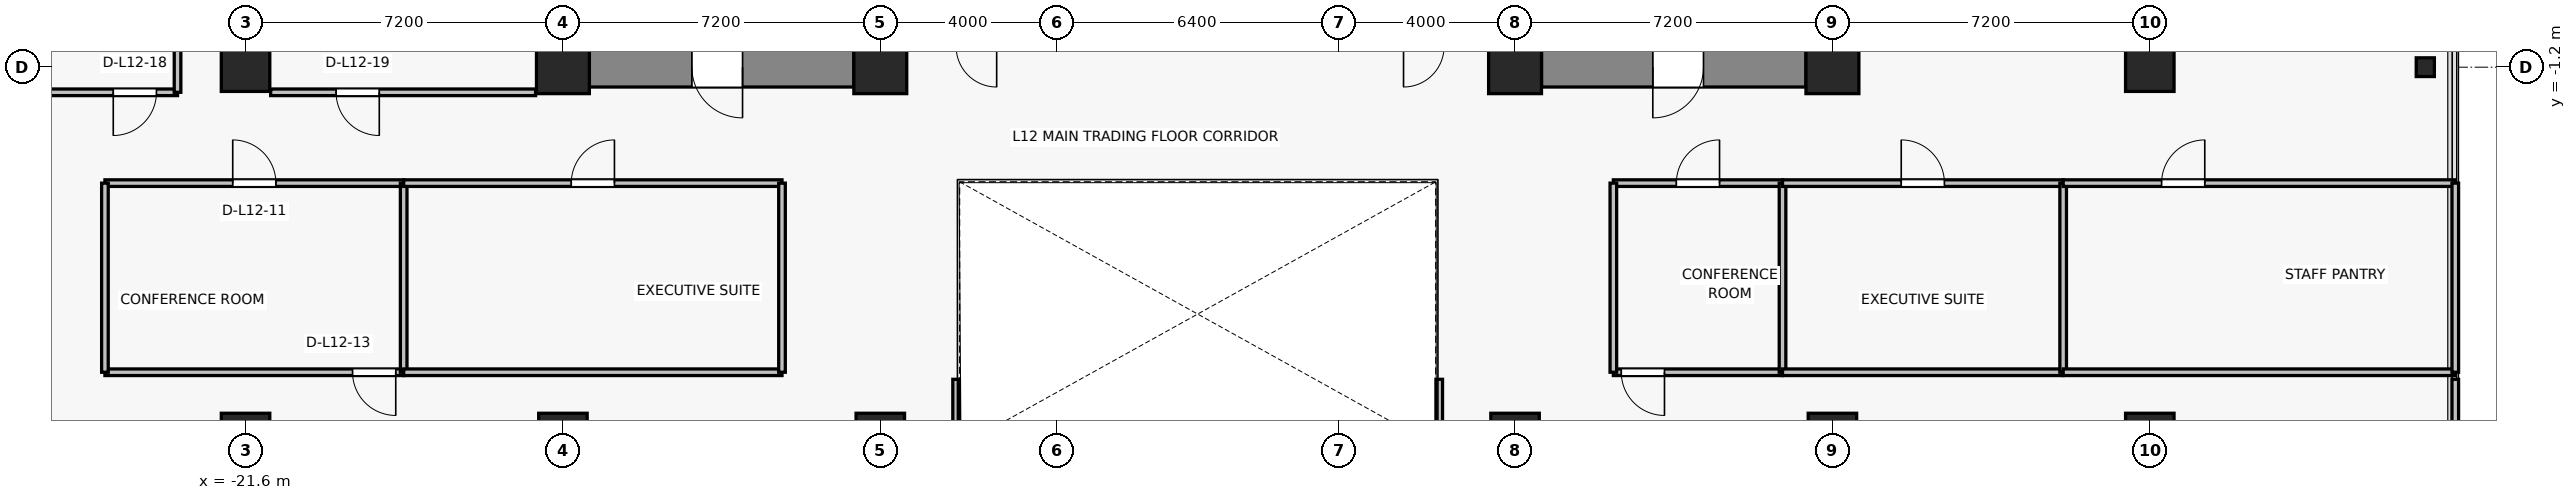
"""IFC4 building model, lengths in metres.
Left out: names, types, materials, properties, quantities, classifications, styles, units other than length and angle.
Written with IfcOpenShell. Run it as: python <this file> out.ifc"""

import sys

from ifc_helpers import new_model, si_unit, direction, frame, frame_2d, origin, origin_2d, place, context, subcontext, project, spatial, rectangle, i_section, extrude, source, transform, mapped, element, fill, save


model = new_model("IFC4")
c1 = context("Model", 3, precision=1e-05, world=origin(), true_north=direction((0.0, 1.0)))
c2 = subcontext(c1, "Body", "Model", "MODEL_VIEW")
j1 = project(units=[si_unit("LENGTHUNIT", "METRE"), si_unit("PLANEANGLEUNIT", "RADIAN")], contexts=[c1])
p1 = place(None, origin())
s1 = spatial("IfcSite", under=j1, at=p1, CompositionType="ELEMENT")
p2 = place(p1, origin())
s2 = spatial("IfcBuilding", under=s1, at=p2, CompositionType="ELEMENT")
p3 = place(p2, frame((0.0, 0.0, 47.2)))
s3 = spatial("IfcBuildingStorey", under=s2, at=p3, CompositionType="ELEMENT", Elevation=47.2)
for number, where, z_axis, x_axis in (
    (1, (-14.4, -1.2, 0.0), (0.0, 0.0, 1.0), (1.0, 0.0, 0.0)),
    (2, (-7.2, -1.2, 0.0), (0.0, 0.0, 1.0), (1.0, 0.0, 0.0)),
    (3, (7.2, -1.2, 0.0), (0.0, 0.0, 1.0), (1.0, 0.0, 0.0)),
    (4, (14.4, -1.2, 0.0), (0.0, 0.0, 1.0), (1.0, 0.0, 0.0)),
):
    element("IfcColumn", number, at=place(p3, frame(where, z_axis=z_axis, x_axis=x_axis)), inside=s3, PredefinedType="COLUMN", context=c2, shape_type="SweptSolid", body=[
        extrude(rectangle(XDim=1.2, YDim=1.2, at=origin_2d()), origin(), (0.0, 0.0, 1.0), 3.3),
    ])
for number, where, z_axis, x_axis in (
    (5, (-14.4, -9.6, 0.0), (0.0, 0.0, 1.0), (1.0, 0.0, 0.0)),
    (6, (-7.2, -9.6, 0.0), (0.0, 0.0, 1.0), (1.0, 0.0, 0.0)),
    (7, (7.2, -9.6, 0.0), (0.0, 0.0, 1.0), (1.0, 0.0, 0.0)),
    (8, (14.4, -9.6, 0.0), (0.0, 0.0, 1.0), (1.0, 0.0, 0.0)),
    (9, (-21.6, -9.6, 0.0), (0.0, 0.0, 1.0), (1.0, 0.0, 0.0)),
    (10, (-21.6, -1.2, 0.0), (0.0, 0.0, 1.0), (1.0, 0.0, 0.0)),
    (11, (21.6, -9.6, 0.0), (0.0, 0.0, 1.0), (1.0, 0.0, 0.0)),
    (12, (21.6, -1.2, 0.0), (0.0, 0.0, 1.0), (1.0, 0.0, 0.0)),
):
    element("IfcColumn", number, at=place(p3, frame(where, z_axis=z_axis, x_axis=x_axis)), inside=s3, PredefinedType="COLUMN", context=c2, shape_type="SweptSolid", body=[
        extrude(rectangle(XDim=1.1, YDim=1.1, at=origin_2d()), origin(), (0.0, 0.0, 1.0), 3.3),
    ])
p4 = place(p3, frame((27.85, -1.2, 0.0), z_axis=(0.0, 0.0, 1.0), x_axis=(1.0, 0.0, 0.0)))
e13 = element("IfcColumn", 13, at=p4, inside=s3, PredefinedType="COLUMN", context=c2, shape_type="SweptSolid", body=[
    extrude(i_section(OverallWidth=0.412, OverallDepth=0.425, WebThickness=0.026, FlangeThickness=0.039, FilletRadius=0.015, at=origin_2d()), origin(), (0.0, 0.0, 1.0), 3.3),
])
p5 = place(p3, frame((-7.8, -1.2, 0.0), z_axis=(0.0, 0.0, 1.0), x_axis=(-1.0, 0.0, 0.0)))
e14 = element("IfcWall", 14, at=p5, inside=s3, PredefinedType="SHEAR", context=c2, shape_type="SweptSolid", body=[
    extrude(rectangle(XDim=6.0, YDim=0.9, at=frame_2d((3.0, 0.0))), origin(), (0.0, 0.0, 1.0), 3.075),
])
p6 = place(p5, frame((2.525, 0.0, 0.0)))
e15 = element("IfcOpeningElement", 15, at=p6, cuts=e14, PredefinedType="OPENING", context=c2, shape_type="SweptSolid", body=[
    extrude(rectangle(XDim=1.15, YDim=2.15, at=frame_2d((0.575, 1.075))), frame((0.0, 0.46, 0.0), z_axis=(0.0, -1.0, 0.0), x_axis=(1.0, 0.0, 0.0)), (0.0, 0.0, 1.0), 0.92),
])
p7 = place(p3, frame((13.8, -1.2, 0.0), z_axis=(0.0, 0.0, 1.0), x_axis=(-1.0, 0.0, 0.0)))
e16 = element("IfcWall", 16, at=p7, inside=s3, PredefinedType="SHEAR", context=c2, shape_type="SweptSolid", body=[
    extrude(rectangle(XDim=6.0, YDim=0.9, at=frame_2d((3.0, 0.0))), origin(), (0.0, 0.0, 1.0), 3.075),
])
p8 = place(p7, frame((2.325, 0.0, 0.0)))
e17 = element("IfcOpeningElement", 17, at=p8, cuts=e16, PredefinedType="OPENING", context=c2, shape_type="SweptSolid", body=[
    extrude(rectangle(XDim=1.15, YDim=2.15, at=frame_2d((0.575, 1.075))), frame((0.0, 0.46, 0.0), z_axis=(0.0, -1.0, 0.0), x_axis=(1.0, 0.0, 0.0)), (0.0, 0.0, 1.0), 0.92),
])
p9 = place(p3, frame((-18.012, -8.12, 0.0), z_axis=(0.0, 0.0, 1.0), x_axis=(-1.0, 0.0, 0.0)))
e18 = element("IfcWall", 18, at=p9, inside=s3, PredefinedType="PARTITIONING", context=c2, shape_type="SweptSolid", body=[
    extrude(rectangle(XDim=6.778, YDim=0.15, at=frame_2d((3.389, 0.0))), origin(), (0.0, 0.0, 1.0), 2.465),
])
p10 = place(p9, frame((0.18, 0.0, 0.0)))
e19 = element("IfcOpeningElement", 19, at=p10, cuts=e18, PredefinedType="OPENING", context=c2, shape_type="SweptSolid", body=[
    extrude(rectangle(XDim=0.98, YDim=2.15, at=frame_2d((0.49, 1.075))), frame((0.0, 0.085, 0.0), z_axis=(0.0, -1.0, 0.0), x_axis=(1.0, 0.0, 0.0)), (0.0, 0.0, 1.0), 0.17),
])
p11 = place(p3, frame((-24.79, -3.83, 0.0), z_axis=(0.0, 0.0, 1.0), x_axis=(1.0, 0.0, 0.0)))
e20 = element("IfcWall", 20, at=p11, inside=s3, PredefinedType="PARTITIONING", context=c2, shape_type="SweptSolid", body=[
    extrude(rectangle(XDim=6.778, YDim=0.15, at=frame_2d((3.389, 0.0))), origin(), (0.0, 0.0, 1.0), 2.465),
])
p12 = place(p11, frame((2.899, 0.0, 0.0)))
e21 = element("IfcOpeningElement", 21, at=p12, cuts=e20, PredefinedType="OPENING", context=c2, shape_type="SweptSolid", body=[
    extrude(rectangle(XDim=0.98, YDim=2.15, at=frame_2d((0.49, 1.075))), frame((0.0, 0.085, 0.0), z_axis=(0.0, -1.0, 0.0), x_axis=(1.0, 0.0, 0.0)), (0.0, 0.0, 1.0), 0.17),
])
for number, where, z_axis, x_axis in (
    (22, (-24.79, -8.12, 0.0), (0.0, 0.0, 1.0), (0.0, 1.0, 0.0)),
    (23, (-18.012, -3.83, 0.0), (0.0, 0.0, 1.0), (0.0, -1.0, 0.0)),
):
    element("IfcWall", number, at=place(p3, frame(where, z_axis=z_axis, x_axis=x_axis)), inside=s3, PredefinedType="PARTITIONING", context=c2, shape_type="SweptSolid", body=[
        extrude(rectangle(XDim=4.29, YDim=0.15, at=frame_2d((2.145, 0.0))), origin(), (0.0, 0.0, 1.0), 2.565),
    ])
p13 = place(p3, frame((-9.43, -8.12, 0.0), z_axis=(0.0, 0.0, 1.0), x_axis=(-1.0, 0.0, 0.0)))
e24 = element("IfcWall", 24, at=p13, inside=s3, PredefinedType="PARTITIONING", context=c2, shape_type="SweptSolid", body=[
    extrude(rectangle(XDim=8.583, YDim=0.15, at=frame_2d((4.291, 0.0))), origin(), (0.0, 0.0, 1.0), 2.465),
])
p14 = place(p3, frame((-18.012, -3.83, 0.0), z_axis=(0.0, 0.0, 1.0), x_axis=(1.0, 0.0, 0.0)))
e25 = element("IfcWall", 25, at=p14, inside=s3, PredefinedType="PARTITIONING", context=c2, shape_type="SweptSolid", body=[
    extrude(rectangle(XDim=8.583, YDim=0.15, at=frame_2d((4.291, 0.0))), origin(), (0.0, 0.0, 1.0), 2.465),
])
p15 = place(p14, frame((3.802, 0.0, 0.0)))
e26 = element("IfcOpeningElement", 26, at=p15, cuts=e25, PredefinedType="OPENING", context=c2, shape_type="SweptSolid", body=[
    extrude(rectangle(XDim=0.98, YDim=2.15, at=frame_2d((0.49, 1.075))), frame((0.0, 0.085, 0.0), z_axis=(0.0, -1.0, 0.0), x_axis=(1.0, 0.0, 0.0)), (0.0, 0.0, 1.0), 0.17),
])
p16 = place(p3, frame((-9.43, -3.83, 0.0), z_axis=(0.0, 0.0, 1.0), x_axis=(0.0, -1.0, 0.0)))
e27 = element("IfcWall", 27, at=p16, inside=s3, PredefinedType="PARTITIONING", context=c2, shape_type="SweptSolid", body=[
    extrude(rectangle(XDim=4.29, YDim=0.15, at=frame_2d((2.145, 0.0))), origin(), (0.0, 0.0, 1.0), 2.565),
])
p17 = place(p3, frame((-5.48, -8.28, 0.0), z_axis=(0.0, 0.0, 1.0), x_axis=(0.0, -1.0, 0.0)))
e28 = element("IfcWall", 28, at=p17, inside=s3, PredefinedType="PARTITIONING", context=c2, shape_type="SweptSolid", body=[
    extrude(rectangle(XDim=9.85, YDim=0.15, at=frame_2d((4.925, 0.0))), origin(), (0.0, 0.0, 1.0), 2.465),
])
p18 = place(p3, frame((13.268, -8.12, 0.0), z_axis=(0.0, 0.0, 1.0), x_axis=(-1.0, 0.0, 0.0)))
e29 = element("IfcWall", 29, at=p18, inside=s3, PredefinedType="PARTITIONING", context=c2, shape_type="SweptSolid", body=[
    extrude(rectangle(XDim=3.838, YDim=0.15, at=frame_2d((1.919, 0.0))), origin(), (0.0, 0.0, 1.0), 3.075),
])
p19 = place(p18, frame((2.678, 0.0, 0.0)))
e30 = element("IfcOpeningElement", 30, at=p19, cuts=e29, PredefinedType="OPENING", context=c2, shape_type="SweptSolid", body=[
    extrude(rectangle(XDim=0.98, YDim=2.15, at=frame_2d((0.49, 1.075))), frame((0.0, 0.085, 0.0), z_axis=(0.0, -1.0, 0.0), x_axis=(1.0, 0.0, 0.0)), (0.0, 0.0, 1.0), 0.17),
])
p20 = place(p3, frame((9.43, -3.83, 0.0), z_axis=(0.0, 0.0, 1.0), x_axis=(1.0, 0.0, 0.0)))
e31 = element("IfcWall", 31, at=p20, inside=s3, PredefinedType="PARTITIONING", context=c2, shape_type="SweptSolid", body=[
    extrude(rectangle(XDim=3.838, YDim=0.15, at=frame_2d((1.919, 0.0))), origin(), (0.0, 0.0, 1.0), 3.075),
])
p21 = place(p20, frame((1.429, 0.0, 0.0)))
e32 = element("IfcOpeningElement", 32, at=p21, cuts=e31, PredefinedType="OPENING", context=c2, shape_type="SweptSolid", body=[
    extrude(rectangle(XDim=0.98, YDim=2.15, at=frame_2d((0.49, 1.075))), frame((0.0, 0.085, 0.0), z_axis=(0.0, -1.0, 0.0), x_axis=(1.0, 0.0, 0.0)), (0.0, 0.0, 1.0), 0.17),
])
for number, where, z_axis, x_axis in (
    (33, (9.43, -8.12, 0.0), (0.0, 0.0, 1.0), (0.0, 1.0, 0.0)),
    (34, (13.268, -3.83, 0.0), (0.0, 0.0, 1.0), (0.0, -1.0, 0.0)),
):
    element("IfcWall", number, at=place(p3, frame(where, z_axis=z_axis, x_axis=x_axis)), inside=s3, PredefinedType="PARTITIONING", context=c2, shape_type="SweptSolid", body=[
        extrude(rectangle(XDim=4.29, YDim=0.15, at=frame_2d((2.145, 0.0))), origin(), (0.0, 0.0, 1.0), 2.565),
    ])
p22 = place(p3, frame((19.635, -8.12, 0.0), z_axis=(0.0, 0.0, 1.0), x_axis=(-1.0, 0.0, 0.0)))
e35 = element("IfcWall", 35, at=p22, inside=s3, PredefinedType="PARTITIONING", context=c2, shape_type="SweptSolid", body=[
    extrude(rectangle(XDim=6.367, YDim=0.15, at=frame_2d((3.183, 0.0))), origin(), (0.0, 0.0, 1.0), 2.465),
])
p23 = place(p3, frame((13.268, -3.83, 0.0), z_axis=(0.0, 0.0, 1.0), x_axis=(1.0, 0.0, 0.0)))
e36 = element("IfcWall", 36, at=p23, inside=s3, PredefinedType="PARTITIONING", context=c2, shape_type="SweptSolid", body=[
    extrude(rectangle(XDim=6.367, YDim=0.15, at=frame_2d((3.183, 0.0))), origin(), (0.0, 0.0, 1.0), 2.465),
])
p24 = place(p23, frame((2.693, 0.0, 0.0)))
e37 = element("IfcOpeningElement", 37, at=p24, cuts=e36, PredefinedType="OPENING", context=c2, shape_type="SweptSolid", body=[
    extrude(rectangle(XDim=0.98, YDim=2.15, at=frame_2d((0.49, 1.075))), frame((0.0, 0.085, 0.0), z_axis=(0.0, -1.0, 0.0), x_axis=(1.0, 0.0, 0.0)), (0.0, 0.0, 1.0), 0.17),
])
p25 = place(p3, frame((19.635, -3.83, 0.0), z_axis=(0.0, 0.0, 1.0), x_axis=(0.0, -1.0, 0.0)))
e38 = element("IfcWall", 38, at=p25, inside=s3, PredefinedType="PARTITIONING", context=c2, shape_type="SweptSolid", body=[
    extrude(rectangle(XDim=4.29, YDim=0.15, at=frame_2d((2.145, 0.0))), origin(), (0.0, 0.0, 1.0), 2.565),
])
p26 = place(p3, frame((28.53, -8.12, 0.0), z_axis=(0.0, 0.0, 1.0), x_axis=(-1.0, 0.0, 0.0)))
e39 = element("IfcWall", 39, at=p26, inside=s3, PredefinedType="PARTITIONING", context=c2, shape_type="SweptSolid", body=[
    extrude(rectangle(XDim=8.895, YDim=0.15, at=frame_2d((4.448, 0.0))), origin(), (0.0, 0.0, 1.0), 2.465),
])
p27 = place(p3, frame((19.635, -3.83, 0.0), z_axis=(0.0, 0.0, 1.0), x_axis=(1.0, 0.0, 0.0)))
e40 = element("IfcWall", 40, at=p27, inside=s3, PredefinedType="PARTITIONING", context=c2, shape_type="SweptSolid", body=[
    extrude(rectangle(XDim=8.895, YDim=0.15, at=frame_2d((4.448, 0.0))), origin(), (0.0, 0.0, 1.0), 2.465),
])
p28 = place(p27, frame((2.232, 0.0, 0.0)))
e41 = element("IfcOpeningElement", 41, at=p28, cuts=e40, PredefinedType="OPENING", context=c2, shape_type="SweptSolid", body=[
    extrude(rectangle(XDim=0.98, YDim=2.15, at=frame_2d((0.49, 1.075))), frame((0.0, 0.085, 0.0), z_axis=(0.0, -1.0, 0.0), x_axis=(1.0, 0.0, 0.0)), (0.0, 0.0, 1.0), 0.17),
])
p29 = place(p3, frame((28.53, -3.83, 0.0), z_axis=(0.0, 0.0, 1.0), x_axis=(0.0, -1.0, 0.0)))
e42 = element("IfcWall", 42, at=p29, inside=s3, PredefinedType="PARTITIONING", context=c2, shape_type="SweptSolid", body=[
    extrude(rectangle(XDim=4.29, YDim=0.15, at=frame_2d((2.145, 0.0))), origin(), (0.0, 0.0, 1.0), 2.665),
])
p30 = place(p3, frame((5.48, -18.13, 0.0), z_axis=(0.0, 0.0, 1.0), x_axis=(0.0, 1.0, 0.0)))
e43 = element("IfcWall", 43, at=p30, inside=s3, PredefinedType="PARTITIONING", context=c2, shape_type="SweptSolid", body=[
    extrude(rectangle(XDim=9.85, YDim=0.15, at=frame_2d((4.925, 0.0))), origin(), (0.0, 0.0, 1.0), 2.465),
])
p31 = place(p3, frame((28.53, -8.28, 0.0), z_axis=(0.0, 0.0, 1.0), x_axis=(0.0, -1.0, 0.0)))
e44 = element("IfcWall", 44, at=p31, inside=s3, PredefinedType="PARTITIONING", context=c2, shape_type="SweptSolid", body=[
    extrude(rectangle(XDim=9.85, YDim=0.15, at=frame_2d((4.925, 0.0))), origin(), (0.0, 0.0, 1.0), 2.665),
])
p32 = place(p3, frame((-23.143, -1.77, 0.0), z_axis=(0.0, 0.0, 1.0), x_axis=(-1.0, 0.0, 0.0)))
e45 = element("IfcWall", 45, at=p32, inside=s3, PredefinedType="PARTITIONING", context=c2, shape_type="SweptSolid", body=[
    extrude(rectangle(XDim=5.853, YDim=0.15, at=frame_2d((2.927, 0.0))), origin(), (0.0, 0.0, 1.0), 3.075),
])
p33 = place(p32, frame((0.478, 0.0, 0.0)))
e46 = element("IfcOpeningElement", 46, at=p33, cuts=e45, PredefinedType="OPENING", context=c2, shape_type="SweptSolid", body=[
    extrude(rectangle(XDim=0.98, YDim=2.15, at=frame_2d((0.49, 1.075))), frame((0.0, 0.085, 0.0), z_axis=(0.0, -1.0, 0.0), x_axis=(1.0, 0.0, 0.0)), (0.0, 0.0, 1.0), 0.17),
])
p34 = place(p3, frame((-23.143, 13.88, 0.0), z_axis=(0.0, 0.0, 1.0), x_axis=(0.0, -1.0, 0.0)))
e47 = element("IfcWall", 47, at=p34, inside=s3, PredefinedType="PARTITIONING", context=c2, shape_type="SweptSolid", body=[
    extrude(rectangle(XDim=15.65, YDim=0.15, at=frame_2d((7.825, 0.0))), origin(), (0.0, 0.0, 1.0), 2.465),
])
p35 = place(p3, frame((-15.02, -1.77, 0.0), z_axis=(0.0, 0.0, 1.0), x_axis=(-1.0, 0.0, 0.0)))
e48 = element("IfcWall", 48, at=p35, inside=s3, PredefinedType="PARTITIONING", context=c2, shape_type="SweptSolid", body=[
    extrude(rectangle(XDim=6.01, YDim=0.15, at=frame_2d((3.005, 0.0))), origin(), (0.0, 0.0, 1.0), 3.075),
])
p36 = place(p35, frame((3.546, 0.0, 0.0)))
e49 = element("IfcOpeningElement", 49, at=p36, cuts=e48, PredefinedType="OPENING", context=c2, shape_type="SweptSolid", body=[
    extrude(rectangle(XDim=0.98, YDim=2.15, at=frame_2d((0.49, 1.075))), frame((0.0, 0.085, 0.0), z_axis=(0.0, -1.0, 0.0), x_axis=(1.0, 0.0, 0.0)), (0.0, 0.0, 1.0), 0.17),
])
m1 = source(origin(), c2, "Body", "SweptSolid", [
    extrude(rectangle(XDim=1.15, YDim=2.15, at=frame_2d((0.575, 1.075))), frame((0.0, 0.025, 0.0), z_axis=(0.0, -1.0, 0.0), x_axis=(1.0, 0.0, 0.0)), (0.0, 0.0, 1.0), 0.05),
])
p37 = place(p6, origin())
e50 = element("IfcDoor", 50, at=p37, inside=s3, OperationType="SINGLE_SWING_LEFT", PredefinedType="DOOR", context=c2, shape_type="MappedRepresentation", body=[
    mapped(m1, transform((0.0, 0.0, 0.0), x_axis=(1.0, 0.0, 0.0), y_axis=(0.0, 1.0, 0.0), z_axis=(0.0, 0.0, 1.0), scale=1.0)),
])
fill(e15, e50)
p38 = place(p8, origin())
e51 = element("IfcDoor", 51, at=p38, inside=s3, OperationType="SINGLE_SWING_RIGHT", PredefinedType="DOOR", context=c2, shape_type="MappedRepresentation", body=[
    mapped(m1, transform((0.0, 0.0, 0.0), x_axis=(1.0, 0.0, 0.0), y_axis=(0.0, 1.0, 0.0), z_axis=(0.0, 0.0, 1.0), scale=1.0)),
])
fill(e17, e51)
m2 = source(origin(), c2, "Body", "SweptSolid", [
    extrude(rectangle(XDim=0.98, YDim=2.15, at=frame_2d((0.49, 1.075))), frame((0.0, 0.025, 0.0), z_axis=(0.0, -1.0, 0.0), x_axis=(1.0, 0.0, 0.0)), (0.0, 0.0, 1.0), 0.05),
])
p39 = place(p12, origin())
e52 = element("IfcDoor", 52, at=p39, inside=s3, OperationType="SINGLE_SWING_LEFT", PredefinedType="DOOR", context=c2, shape_type="MappedRepresentation", body=[
    mapped(m2, transform((0.0, 0.0, 0.0), x_axis=(1.0, 0.0, 0.0), y_axis=(0.0, 1.0, 0.0), z_axis=(0.0, 0.0, 1.0), scale=1.0)),
])
fill(e21, e52)
p40 = place(p15, origin())
e53 = element("IfcDoor", 53, at=p40, inside=s3, OperationType="SINGLE_SWING_RIGHT", PredefinedType="DOOR", context=c2, shape_type="MappedRepresentation", body=[
    mapped(m2, transform((0.0, 0.0, 0.0), x_axis=(1.0, 0.0, 0.0), y_axis=(0.0, 1.0, 0.0), z_axis=(0.0, 0.0, 1.0), scale=1.0)),
])
fill(e26, e53)
p41 = place(p10, origin())
e54 = element("IfcDoor", 54, at=p41, inside=s3, OperationType="SINGLE_SWING_LEFT", PredefinedType="DOOR", context=c2, shape_type="MappedRepresentation", body=[
    mapped(m2, transform((0.0, 0.0, 0.0), x_axis=(1.0, 0.0, 0.0), y_axis=(0.0, 1.0, 0.0), z_axis=(0.0, 0.0, 1.0), scale=1.0)),
])
fill(e19, e54)
p42 = place(p21, origin())
e55 = element("IfcDoor", 55, at=p42, inside=s3, OperationType="SINGLE_SWING_RIGHT", PredefinedType="DOOR", context=c2, shape_type="MappedRepresentation", body=[
    mapped(m2, transform((0.0, 0.0, 0.0), x_axis=(1.0, 0.0, 0.0), y_axis=(0.0, 1.0, 0.0), z_axis=(0.0, 0.0, 1.0), scale=1.0)),
])
fill(e32, e55)
p43 = place(p24, origin())
e56 = element("IfcDoor", 56, at=p43, inside=s3, OperationType="SINGLE_SWING_LEFT", PredefinedType="DOOR", context=c2, shape_type="MappedRepresentation", body=[
    mapped(m2, transform((0.0, 0.0, 0.0), x_axis=(1.0, 0.0, 0.0), y_axis=(0.0, 1.0, 0.0), z_axis=(0.0, 0.0, 1.0), scale=1.0)),
])
fill(e37, e56)
p44 = place(p28, origin())
e57 = element("IfcDoor", 57, at=p44, inside=s3, OperationType="SINGLE_SWING_RIGHT", PredefinedType="DOOR", context=c2, shape_type="MappedRepresentation", body=[
    mapped(m2, transform((0.0, 0.0, 0.0), x_axis=(1.0, 0.0, 0.0), y_axis=(0.0, 1.0, 0.0), z_axis=(0.0, 0.0, 1.0), scale=1.0)),
])
fill(e41, e57)
p45 = place(p19, origin())
e58 = element("IfcDoor", 58, at=p45, inside=s3, OperationType="SINGLE_SWING_LEFT", PredefinedType="DOOR", context=c2, shape_type="MappedRepresentation", body=[
    mapped(m2, transform((0.0, 0.0, 0.0), x_axis=(1.0, 0.0, 0.0), y_axis=(0.0, 1.0, 0.0), z_axis=(0.0, 0.0, 1.0), scale=1.0)),
])
fill(e30, e58)
p46 = place(p33, origin())
e59 = element("IfcDoor", 59, at=p46, inside=s3, OperationType="SINGLE_SWING_RIGHT", PredefinedType="DOOR", context=c2, shape_type="MappedRepresentation", body=[
    mapped(m2, transform((0.0, 0.0, 0.0), x_axis=(1.0, 0.0, 0.0), y_axis=(0.0, 1.0, 0.0), z_axis=(0.0, 0.0, 1.0), scale=1.0)),
])
fill(e46, e59)
p47 = place(p36, origin())
e60 = element("IfcDoor", 60, at=p47, inside=s3, OperationType="SINGLE_SWING_LEFT", PredefinedType="DOOR", context=c2, shape_type="MappedRepresentation", body=[
    mapped(m2, transform((0.0, 0.0, 0.0), x_axis=(1.0, 0.0, 0.0), y_axis=(0.0, 1.0, 0.0), z_axis=(0.0, 0.0, 1.0), scale=1.0)),
])
fill(e49, e60)
save(model, sys.argv[1])
